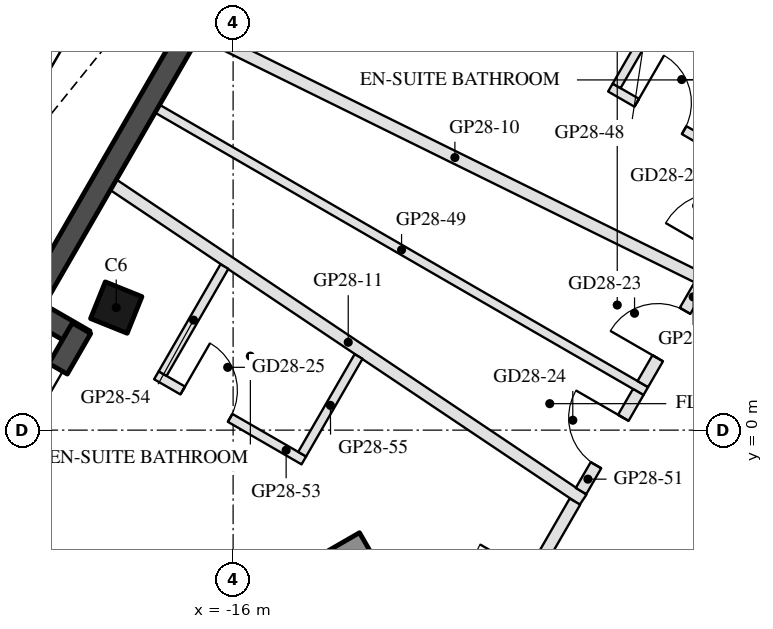
"""IFC4 building model, lengths in metres.
Left out: names, types, materials, properties, quantities, classifications, styles, units other than length and angle.
Written with IfcOpenShell. Run it as: python <this file> out.ifc"""

import sys

from ifc_helpers import new_model, si_unit, direction, frame, frame_2d, origin, origin_2d, place, context, subcontext, project, spatial, rectangle, hollow_rectangle, extrude, boolean, halfspace, element, fill, save


model = new_model("IFC4")
c1 = context("Model", 3, precision=1e-05, world=origin(), true_north=direction((0.0, 1.0)))
c2 = subcontext(c1, "Body", "Model", "MODEL_VIEW")
j1 = project(units=[si_unit("LENGTHUNIT", "METRE"), si_unit("PLANEANGLEUNIT", "RADIAN")], contexts=[c1])
p1 = place(None, origin())
s1 = spatial("IfcSite", under=j1, at=p1, CompositionType="ELEMENT")
p2 = place(p1, origin())
s2 = spatial("IfcBuilding", under=s1, at=p2, CompositionType="ELEMENT")
p3 = place(p2, frame((0.0, 0.0, 287.4)))
s3 = spatial("IfcBuildingStorey", under=s2, at=p3, CompositionType="ELEMENT", Elevation=287.4)
p4 = place(p3, frame((-17.922, 2.016, 0.0), z_axis=(0.161441555696, -0.022914285325, 0.986616216987), x_axis=(-0.49507293815, -0.866715878813, 0.060879974747)))
e1 = element("IfcColumn", 1, at=p4, inside=s3, PredefinedType="COLUMN", context=c2, shape_type="SweptSolid", body=[
    boolean("DIFFERENCE", boolean("DIFFERENCE", extrude(hollow_rectangle(XDim=0.65, YDim=0.65, WallThickness=0.03, at=origin_2d()), origin(), (0.0, 0.0, 1.0), 3.75), halfspace(frame((0.0, 0.0, 0.04), z_axis=(0.0, 0.0, 1.0), x_axis=(1.0, 0.0, 0.0)), True)), halfspace(frame((0.0, 0.0, 3.711), z_axis=(0.0, 0.0, 1.0), x_axis=(1.0, 0.0, 0.0)), False)),
])
p5 = place(p3, frame((-14.925, 9.656, 0.0), z_axis=(0.0, 0.0, 1.0), x_axis=(-0.500018599098, -0.866014665324, 0.0)))
e2 = element("IfcWall", 2, at=p5, inside=s3, PredefinedType="SOLIDWALL", context=c2, shape_type="SweptSolid", body=[
    extrude(rectangle(XDim=9.015, YDim=0.35, at=frame_2d((4.508, 0.0))), origin(), (0.0, 0.0, 1.0), 3.55),
])
p6 = place(p5, frame((1.614, 0.0, 0.0)))
e3 = element("IfcOpeningElement", 3, at=p6, cuts=e2, PredefinedType="OPENING", context=c2, shape_type="SweptSolid", body=[
    extrude(rectangle(XDim=1.4, YDim=2.4, at=frame_2d((0.7, 1.2))), frame((0.0, 0.185, 0.0), z_axis=(0.0, -1.0, 0.0), x_axis=(1.0, 0.0, 0.0)), (0.0, 0.0, 1.0), 0.37),
])
p7 = place(p3, frame((-19.497, 2.088, 0.0), z_axis=(0.0, 0.0, 1.0), x_axis=(0.866005645448, -0.500034220881, 0.0)))
e4 = element("IfcWall", 4, at=p7, inside=s3, PredefinedType="SOLIDWALL", context=c2, shape_type="SweptSolid", body=[
    extrude(rectangle(XDim=1.22, YDim=0.35, at=frame_2d((0.61, 0.0))), origin(), (0.0, 0.0, 1.0), 3.55),
])
p8 = place(p3, frame((-18.493, 1.676, 0.0), z_axis=(0.0, 0.0, 1.0), x_axis=(-0.499985371027, -0.866033849661, 0.0)))
e5 = element("IfcWall", 5, at=p8, inside=s3, PredefinedType="SOLIDWALL", context=c2, shape_type="SweptSolid", body=[
    extrude(rectangle(XDim=6.055, YDim=0.35, at=frame_2d((3.028, 0.0))), origin(), (0.0, 0.0, 1.0), 3.55),
])
p9 = place(p8, frame((0.77, 0.0, 0.0)))
e6 = element("IfcOpeningElement", 6, at=p9, cuts=e5, PredefinedType="OPENING", context=c2, shape_type="SweptSolid", body=[
    extrude(rectangle(XDim=2.4, YDim=2.4, at=frame_2d((1.2, 1.2))), frame((0.0, 0.185, 0.0), z_axis=(0.0, -1.0, 0.0), x_axis=(1.0, 0.0, 0.0)), (0.0, 0.0, 1.0), 0.37),
])
p10 = place(p8, frame((3.47, 0.0, 0.3)))
e7 = element("IfcOpeningElement", 7, at=p10, cuts=e5, PredefinedType="OPENING", context=c2, shape_type="SweptSolid", body=[
    extrude(rectangle(XDim=2.2, YDim=2.65, at=frame_2d((1.1, 1.325))), frame((0.0, 0.185, 0.0), z_axis=(0.0, -1.0, 0.0), x_axis=(1.0, 0.0, 0.0)), (0.0, 0.0, 1.0), 0.37),
])
p11 = place(p3, frame((-13.797, -1.903, 0.0), z_axis=(0.0, 0.0, 1.0), x_axis=(-0.866024688907, -0.500001238203, 0.0)))
e8 = element("IfcWall", 8, at=p11, inside=s3, PredefinedType="SHEAR", context=c2, shape_type="SweptSolid", body=[
    extrude(rectangle(XDim=12.129, YDim=0.5, at=frame_2d((6.064, 0.0))), origin(), (0.0, 0.0, 1.0), 3.5),
])
p12 = place(p3, frame((-13.444, 10.071, 0.0), z_axis=(0.0, 0.0, 1.0), x_axis=(0.866030795796, -0.499990660646, 0.0)))
e9 = element("IfcWall", 9, at=p12, inside=s3, PredefinedType="PARTITIONING", context=c2, shape_type="SweptSolid", body=[
    extrude(rectangle(XDim=8.379, YDim=0.2, at=frame_2d((4.189, 0.0))), origin(), (0.0, 0.0, 1.0), 3.1),
])
p13 = place(p3, frame((-16.524, 6.538, 0.0), z_axis=(0.0, 0.0, 1.0), x_axis=(0.897120251728, -0.441786434762, 0.0)))
e10 = element("IfcWall", 10, at=p13, inside=s3, PredefinedType="PARTITIONING", context=c2, shape_type="SweptSolid", body=[
    extrude(rectangle(XDim=9.299, YDim=0.2, at=frame_2d((4.649, 0.0))), origin(), (0.0, 0.0, 1.0), 3.1),
])
p14 = place(p3, frame((-17.969, 4.035, 0.0), z_axis=(0.0, 0.0, 1.0), x_axis=(0.830560992963, -0.556927676604, 0.0)))
e11 = element("IfcWall", 11, at=p14, inside=s3, PredefinedType="PARTITIONING", context=c2, shape_type="SweptSolid", body=[
    extrude(rectangle(XDim=9.3, YDim=0.2, at=frame_2d((4.65, 0.0))), origin(), (0.0, 0.0, 1.0), 3.1),
])
p15 = place(p3, frame((-9.795, 5.634, 0.0), z_axis=(0.0, 0.0, 1.0), x_axis=(0.866034573852, -0.49998411664, 0.0)))
e12 = element("IfcWall", 12, at=p15, inside=s3, PredefinedType="PARTITIONING", context=c2, shape_type="SweptSolid", body=[
    extrude(rectangle(XDim=2.8, YDim=0.15, at=frame_2d((1.4, 0.0))), origin(), (0.0, 0.0, 1.0), 3.05),
])
p16 = place(p15, frame((0.5, 0.0, 0.0)))
e13 = element("IfcOpeningElement", 13, at=p16, cuts=e12, PredefinedType="OPENING", context=c2, shape_type="SweptSolid", body=[
    extrude(rectangle(XDim=0.9, YDim=2.1, at=frame_2d((0.45, 1.05))), frame((0.0, 0.085, 0.0), z_axis=(0.0, -1.0, 0.0), x_axis=(1.0, 0.0, 0.0)), (0.0, 0.0, 1.0), 0.17),
])
p17 = place(p3, frame((-8.771, 7.258, 0.0), z_axis=(0.0, 0.0, 1.0), x_axis=(-0.50002820729, -0.866009117685, 0.0)))
e14 = element("IfcWall", 14, at=p17, inside=s3, PredefinedType="PARTITIONING", context=c2, shape_type="SweptSolid", body=[
    extrude(rectangle(XDim=1.843, YDim=0.15, at=frame_2d((0.922, 0.0))), origin(), (0.0, 0.0, 1.0), 3.05),
])
p18 = place(p3, frame((-17.246, 5.286, 0.0), z_axis=(0.0, 0.0, 1.0), x_axis=(0.865746766399, -0.500482303853, 0.0)))
e15 = element("IfcWall", 15, at=p18, inside=s3, PredefinedType="PARTITIONING", context=c2, shape_type="SweptSolid", body=[
    extrude(rectangle(XDim=9.279, YDim=0.15, at=frame_2d((4.639, 0.0))), origin(), (0.0, 0.0, 1.0), 3.1),
])
p19 = place(p3, frame((-9.262, 0.758, 0.0), z_axis=(0.0, 0.0, 1.0), x_axis=(0.500074377092, 0.865982457891, 0.0)))
e16 = element("IfcWall", 16, at=p19, inside=s3, PredefinedType="PARTITIONING", context=c2, shape_type="SweptSolid", body=[
    extrude(rectangle(XDim=1.882, YDim=0.2, at=frame_2d((0.941, 0.0))), origin(), (0.0, 0.0, 1.0), 3.05),
])
p20 = place(p19, frame((0.491, 0.0, 0.0)))
e17 = element("IfcOpeningElement", 17, at=p20, cuts=e16, PredefinedType="OPENING", context=c2, shape_type="SweptSolid", body=[
    extrude(rectangle(XDim=0.9, YDim=2.1, at=frame_2d((0.45, 1.05))), frame((0.0, 0.11, 0.0), z_axis=(0.0, -1.0, 0.0), x_axis=(1.0, 0.0, 0.0)), (0.0, 0.0, 1.0), 0.22),
])
p21 = place(p3, frame((-10.278, -1.002, 0.0), z_axis=(0.0, 0.0, 1.0), x_axis=(0.499977061294, 0.866038647048, 0.0)))
e18 = element("IfcWall", 18, at=p21, inside=s3, PredefinedType="PARTITIONING", context=c2, shape_type="SweptSolid", body=[
    extrude(rectangle(XDim=1.881, YDim=0.2, at=frame_2d((0.941, 0.0))), origin(), (0.0, 0.0, 1.0), 3.55),
])
p22 = place(p21, frame((0.491, 0.0, 0.0)))
e19 = element("IfcOpeningElement", 19, at=p22, cuts=e18, PredefinedType="OPENING", context=c2, shape_type="SweptSolid", body=[
    extrude(rectangle(XDim=0.9, YDim=2.1, at=frame_2d((0.45, 1.05))), frame((0.0, 0.11, 0.0), z_axis=(0.0, -1.0, 0.0), x_axis=(1.0, 0.0, 0.0)), (0.0, 0.0, 1.0), 0.22),
])
p23 = place(p3, frame((-12.269, -4.45, 0.0), z_axis=(0.0, 0.0, 1.0), x_axis=(0.500000040646, 0.866025380318, 0.0)))
e20 = element("IfcWall", 20, at=p23, inside=s3, PredefinedType="PARTITIONING", context=c2, shape_type="SweptSolid", body=[
    extrude(rectangle(XDim=3.781, YDim=0.2, at=frame_2d((1.891, 0.0))), origin(), (0.0, 0.0, 1.0), 3.05),
])
p24 = place(p23, frame((1.391, 0.0, 0.0)))
e21 = element("IfcOpeningElement", 21, at=p24, cuts=e20, PredefinedType="OPENING", context=c2, shape_type="SweptSolid", body=[
    extrude(rectangle(XDim=1.0, YDim=2.1, at=frame_2d((0.5, 1.05))), frame((0.0, 0.11, 0.0), z_axis=(0.0, -1.0, 0.0), x_axis=(1.0, 0.0, 0.0)), (0.0, 0.0, 1.0), 0.22),
])
p25 = place(p3, frame((-17.262, 0.902, 0.0), z_axis=(0.0, 0.0, 1.0), x_axis=(0.866034573852, -0.49998411664, 0.0)))
e22 = element("IfcWall", 22, at=p25, inside=s3, PredefinedType="PARTITIONING", context=c2, shape_type="SweptSolid", body=[
    extrude(rectangle(XDim=2.8, YDim=0.15, at=frame_2d((1.4, 0.0))), origin(), (0.0, 0.0, 1.0), 3.1),
])
p26 = place(p25, frame((0.5, 0.0, 0.0)))
e23 = element("IfcOpeningElement", 23, at=p26, cuts=e22, PredefinedType="OPENING", context=c2, shape_type="SweptSolid", body=[
    extrude(rectangle(XDim=0.9, YDim=2.1, at=frame_2d((0.45, 1.05))), frame((0.0, 0.085, 0.0), z_axis=(0.0, -1.0, 0.0), x_axis=(1.0, 0.0, 0.0)), (0.0, 0.0, 1.0), 0.17),
])
p27 = place(p3, frame((-16.143, 2.69, 0.0), z_axis=(0.0, 0.0, 1.0), x_axis=(-0.500013496215, -0.866017611601, 0.0)))
e24 = element("IfcWall", 24, at=p27, inside=s3, PredefinedType="PARTITIONING", context=c2, shape_type="SweptSolid", body=[
    extrude(rectangle(XDim=2.033, YDim=0.15, at=frame_2d((1.017, 0.0))), origin(), (0.0, 0.0, 1.0), 3.05),
])
p28 = place(p3, frame((-13.937, 1.211, 0.0), z_axis=(0.0, 0.0, 1.0), x_axis=(-0.500003477455, -0.866023396066, 0.0)))
e25 = element("IfcWall", 25, at=p28, inside=s3, PredefinedType="PARTITIONING", context=c2, shape_type="SweptSolid", body=[
    extrude(rectangle(XDim=1.855, YDim=0.15, at=frame_2d((0.927, 0.0))), origin(), (0.0, 0.0, 1.0), 3.05),
])
p29 = place(p9, frame((2.4, 0.0, 0.0), z_axis=(0.0, 0.0, 1.0), x_axis=(-1.0, 0.0, 0.0)))
e26 = element("IfcDoor", 26, at=p29, inside=s3, OperationType="SLIDING_TO_LEFT", PredefinedType="DOOR", context=c2, shape_type="SweptSolid", body=[
    extrude(rectangle(XDim=2.4, YDim=2.4, at=frame_2d((1.2, 1.2))), frame((0.0, 0.025, 0.0), z_axis=(0.0, -1.0, 0.0), x_axis=(1.0, 0.0, 0.0)), (0.0, 0.0, 1.0), 0.05),
])
fill(e6, e26)
p30 = place(p16, origin())
e27 = element("IfcDoor", 27, at=p30, inside=s3, OperationType="SINGLE_SWING_LEFT", PredefinedType="DOOR", context=c2, shape_type="SweptSolid", body=[
    extrude(rectangle(XDim=0.9, YDim=2.1, at=frame_2d((0.45, 1.05))), frame((0.0, 0.025, 0.0), z_axis=(0.0, -1.0, 0.0), x_axis=(1.0, 0.0, 0.0)), (0.0, 0.0, 1.0), 0.05),
])
fill(e13, e27)
p31 = place(p20, origin())
e28 = element("IfcDoor", 28, at=p31, inside=s3, OperationType="SINGLE_SWING_LEFT", PredefinedType="DOOR", context=c2, shape_type="SweptSolid", body=[
    extrude(rectangle(XDim=0.9, YDim=2.1, at=frame_2d((0.45, 1.05))), frame((0.0, 0.025, 0.0), z_axis=(0.0, -1.0, 0.0), x_axis=(1.0, 0.0, 0.0)), (0.0, 0.0, 1.0), 0.05),
])
fill(e17, e28)
p32 = place(p22, origin())
e29 = element("IfcDoor", 29, at=p32, inside=s3, OperationType="SINGLE_SWING_RIGHT", PredefinedType="DOOR", context=c2, shape_type="SweptSolid", body=[
    extrude(rectangle(XDim=0.9, YDim=2.1, at=frame_2d((0.45, 1.05))), frame((0.0, 0.025, 0.0), z_axis=(0.0, -1.0, 0.0), x_axis=(1.0, 0.0, 0.0)), (0.0, 0.0, 1.0), 0.05),
])
fill(e19, e29)
p33 = place(p26, origin())
e30 = element("IfcDoor", 30, at=p33, inside=s3, OperationType="SINGLE_SWING_LEFT", PredefinedType="DOOR", context=c2, shape_type="SweptSolid", body=[
    extrude(rectangle(XDim=0.9, YDim=2.1, at=frame_2d((0.45, 1.05))), frame((0.0, 0.025, 0.0), z_axis=(0.0, -1.0, 0.0), x_axis=(1.0, 0.0, 0.0)), (0.0, 0.0, 1.0), 0.05),
])
fill(e23, e30)
save(model, sys.argv[1])
